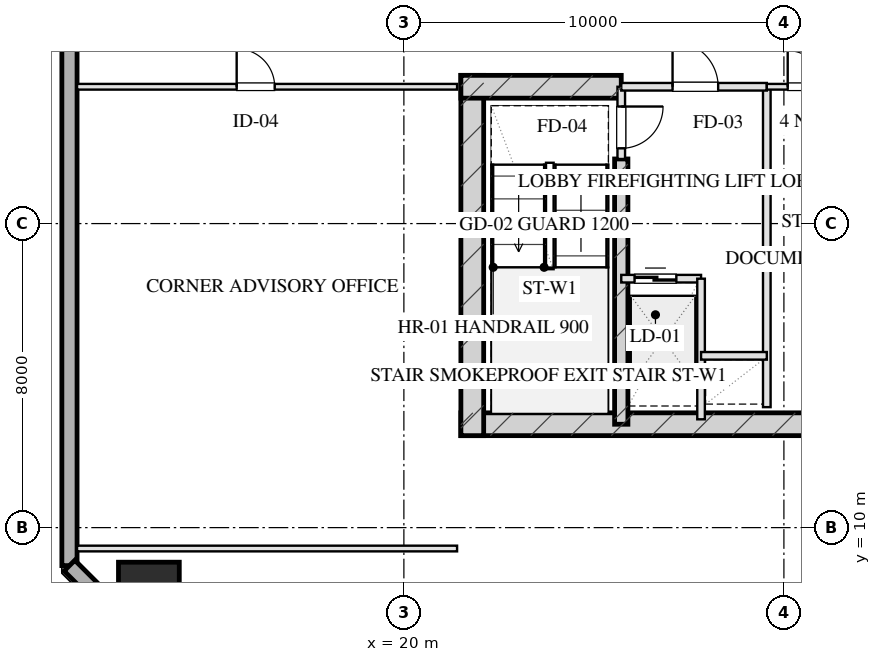
"""IFC4 building model, lengths in metres.
Left out: names, types, materials, properties, quantities, classifications, styles, units other than length and angle.
Written with IfcOpenShell. Run it as: python <this file> out.ifc"""

import sys

from ifc_helpers import new_model, si_unit, direction, frame, frame_2d, origin, origin_2d, place, context, subcontext, project, spatial, rectangle, hollow_rectangle, extrude, element, fill, save


model = new_model("IFC4")
c1 = context("Model", 3, precision=1e-05, world=origin(), true_north=direction((0.0, 1.0)))
c2 = subcontext(c1, "Body", "Model", "MODEL_VIEW")
j1 = project(units=[si_unit("LENGTHUNIT", "METRE"), si_unit("PLANEANGLEUNIT", "RADIAN")], contexts=[c1])
p1 = place(None, origin())
s1 = spatial("IfcSite", under=j1, at=p1, CompositionType="ELEMENT")
p2 = place(p1, origin())
s2 = spatial("IfcBuilding", under=s1, at=p2, CompositionType="ELEMENT")
p3 = place(p2, frame((0.0, 0.0, 113.85)))
s3 = spatial("IfcBuildingStorey", under=s2, at=p3, CompositionType="ELEMENT", Elevation=113.85)
p4 = place(p3, frame((21.5, 12.72, 0.0), z_axis=(0.0, 0.0, 1.0), x_axis=(1.0, 0.0, 0.0)))
e1 = element("IfcWall", 1, at=p4, inside=s3, PredefinedType="SHEAR", context=c2, shape_type="SweptSolid", body=[
    extrude(rectangle(XDim=17.0, YDim=0.6, at=frame_2d((8.5, 0.0))), origin(), (0.0, 0.0, 1.0), 3.45),
])
p5 = place(p3, frame((21.8, 21.9, 0.0), z_axis=(0.0, 0.0, 1.0), x_axis=(0.0, -1.0, 0.0)))
e2 = element("IfcWall", 2, at=p5, inside=s3, PredefinedType="SHEAR", context=c2, shape_type="SweptSolid", body=[
    extrude(rectangle(XDim=9.48, YDim=0.6, at=frame_2d((4.74, 0.0))), origin(), (0.0, 0.0, 1.0), 3.45),
])
p6 = place(p3, frame((25.72, 19.7, 0.0), z_axis=(0.0, 0.0, 1.0), x_axis=(0.0, -1.0, 0.0)))
e3 = element("IfcWall", 3, at=p6, inside=s3, PredefinedType="SHEAR", context=c2, shape_type="SweptSolid", body=[
    extrude(rectangle(XDim=6.98, YDim=0.35, at=frame_2d((3.49, 0.0))), origin(), (0.0, 0.0, 1.0), 3.45),
])
p7 = place(p3, frame((21.5, 21.6, 0.0), z_axis=(0.0, 0.0, 1.0), x_axis=(1.0, 0.0, 0.0)))
e4 = element("IfcWall", 4, at=p7, inside=s3, PredefinedType="SHEAR", context=c2, shape_type="SweptSolid", body=[
    extrude(rectangle(XDim=4.22, YDim=0.6, at=frame_2d((2.11, 0.0))), origin(), (0.0, 0.0, 1.0), 3.45),
])
p8 = place(p3, frame((13.29, 8.29, 0.0), z_axis=(0.0, 0.0, 1.0), x_axis=(1.0, 0.0, 0.0)))
e5 = element("IfcColumn", 5, at=p8, inside=s3, PredefinedType="COLUMN", context=c2, shape_type="SweptSolid", body=[
    extrude(hollow_rectangle(XDim=1.6, YDim=1.6, WallThickness=0.055, at=origin_2d()), origin(), (0.0, 0.0, 1.0), 3.451),
])
p9 = place(p3, frame((11.2, 9.0, 0.0), z_axis=(0.0, 0.0, 1.0), x_axis=(0.0, 1.0, 0.0)))
e6 = element("IfcWall", 6, at=p9, inside=s3, PredefinedType="SOLIDWALL", context=c2, shape_type="SweptSolid", body=[
    extrude(rectangle(XDim=50.0, YDim=0.4, at=frame_2d((25.0, 0.0))), origin(), (0.0, 0.0, 1.0), 2.61),
])
p10 = place(p9, frame((27.336, 0.0, 0.0)))
e7 = element("IfcOpeningElement", 7, at=p10, cuts=e6, PredefinedType="OPENING", context=c2, shape_type="SweptSolid", body=[
    extrude(rectangle(XDim=1.1, YDim=2.15, at=frame_2d((0.55, 1.075))), frame((0.0, 0.21, 0.0), z_axis=(0.0, -1.0, 0.0), x_axis=(1.0, 0.0, 0.0)), (0.0, 0.0, 1.0), 0.42),
])
p11 = place(p3, frame((14.0, 6.2, 0.0), z_axis=(0.0, 0.0, 1.0), x_axis=(-0.707106781187, 0.707106781187, 0.0)))
e8 = element("IfcWall", 8, at=p11, inside=s3, PredefinedType="SOLIDWALL", context=c2, shape_type="SweptSolid", body=[
    extrude(rectangle(XDim=3.96, YDim=0.4, at=frame_2d((1.98, 0.0))), origin(), (0.0, 0.0, 1.0), 2.61),
])
p12 = place(p3, frame((25.72, 21.6, 0.0), z_axis=(0.0, 0.0, 1.0), x_axis=(0.0, -1.0, 0.0)))
e9 = element("IfcWall", 9, at=p12, inside=s3, PredefinedType="PARTITIONING", context=c2, shape_type="SweptSolid", body=[
    extrude(rectangle(XDim=1.9, YDim=0.2, at=frame_2d((0.95, 0.0))), origin(), (0.0, 0.0, 1.0), 3.175),
])
p13 = place(p12, frame((0.52, 0.0, 0.0)))
e10 = element("IfcOpeningElement", 10, at=p13, cuts=e9, PredefinedType="OPENING", context=c2, shape_type="SweptSolid", body=[
    extrude(rectangle(XDim=1.1, YDim=2.05, at=frame_2d((0.55, 1.025))), frame((0.0, 0.11, 0.0), z_axis=(0.0, -1.0, 0.0), x_axis=(1.0, 0.0, 0.0)), (0.0, 0.0, 1.0), 0.22),
])
p14 = place(p3, frame((29.55, 21.6, 0.0), z_axis=(0.0, 0.0, 1.0), x_axis=(0.0, -1.0, 0.0)))
e11 = element("IfcWall", 11, at=p14, inside=s3, PredefinedType="PARTITIONING", context=c2, shape_type="SweptSolid", body=[
    extrude(rectangle(XDim=8.43, YDim=0.2, at=frame_2d((4.215, 0.0))), origin(), (0.0, 0.0, 1.0), 3.175),
])
p15 = place(p3, frame((25.72, 21.6, 0.0), z_axis=(0.0, 0.0, 1.0), x_axis=(1.0, 0.0, 0.0)))
e12 = element("IfcWall", 12, at=p15, inside=s3, PredefinedType="PARTITIONING", context=c2, shape_type="SweptSolid", body=[
    extrude(rectangle(XDim=3.83, YDim=0.2, at=frame_2d((1.915, 0.0))), origin(), (0.0, 0.0, 1.0), 3.175),
])
p16 = place(p15, frame((1.35, 0.0, 0.0)))
e13 = element("IfcOpeningElement", 13, at=p16, cuts=e12, PredefinedType="OPENING", context=c2, shape_type="SweptSolid", body=[
    extrude(rectangle(XDim=1.2, YDim=2.05, at=frame_2d((0.6, 1.025))), frame((0.0, 0.11, 0.0), z_axis=(0.0, -1.0, 0.0), x_axis=(1.0, 0.0, 0.0)), (0.0, 0.0, 1.0), 0.22),
])
p17 = place(p3, frame((25.72, 16.55, 0.0), z_axis=(0.0, 0.0, 1.0), x_axis=(1.0, 0.0, 0.0)))
e14 = element("IfcWall", 14, at=p17, inside=s3, PredefinedType="PARTITIONING", context=c2, shape_type="SweptSolid", body=[
    extrude(rectangle(XDim=2.1, YDim=0.2, at=frame_2d((1.05, 0.0))), origin(), (0.0, 0.0, 1.0), 3.175),
])
p18 = place(p17, frame((0.35, 0.0, 0.0)))
e15 = element("IfcOpeningElement", 15, at=p18, cuts=e14, PredefinedType="OPENING", context=c2, shape_type="SweptSolid", body=[
    extrude(rectangle(XDim=1.1, YDim=2.05, at=frame_2d((0.55, 1.025))), frame((0.0, 0.11, 0.0), z_axis=(0.0, -1.0, 0.0), x_axis=(1.0, 0.0, 0.0)), (0.0, 0.0, 1.0), 0.22),
])
p19 = place(p3, frame((27.82, 16.55, 0.0), z_axis=(0.0, 0.0, 1.0), x_axis=(0.0, -1.0, 0.0)))
e16 = element("IfcWall", 16, at=p19, inside=s3, PredefinedType="PARTITIONING", context=c2, shape_type="SweptSolid", body=[
    extrude(rectangle(XDim=3.7, YDim=0.2, at=frame_2d((1.85, 0.0))), origin(), (0.0, 0.0, 1.0), 3.175),
])
p20 = place(p3, frame((27.82, 14.52, 0.0), z_axis=(0.0, 0.0, 1.0), x_axis=(1.0, 0.0, 0.0)))
e17 = element("IfcWall", 17, at=p20, inside=s3, PredefinedType="PARTITIONING", context=c2, shape_type="SweptSolid", body=[
    extrude(rectangle(XDim=1.73, YDim=0.2, at=frame_2d((0.865, 0.0))), origin(), (0.0, 0.0, 1.0), 3.175),
])
p21 = place(p3, frame((29.55, 21.6, 0.0), z_axis=(0.0, 0.0, 1.0), x_axis=(1.0, 0.0, 0.0)))
e18 = element("IfcWall", 18, at=p21, inside=s3, PredefinedType="PARTITIONING", context=c2, shape_type="SweptSolid", body=[
    extrude(rectangle(XDim=4.4, YDim=0.15, at=frame_2d((2.2, 0.0))), origin(), (0.0, 0.0, 1.0), 3.175),
])
p22 = place(p21, frame((0.55, 0.0, 0.0)))
e19 = element("IfcOpeningElement", 19, at=p22, cuts=e18, PredefinedType="OPENING", context=c2, shape_type="SweptSolid", body=[
    extrude(rectangle(XDim=0.95, YDim=2.05, at=frame_2d((0.475, 1.025))), frame((0.0, 0.085, 0.0), z_axis=(0.0, -1.0, 0.0), x_axis=(1.0, 0.0, 0.0)), (0.0, 0.0, 1.0), 0.17),
])
p23 = place(p21, frame((2.7, 0.0, 0.0)))
e20 = element("IfcOpeningElement", 20, at=p23, cuts=e18, PredefinedType="OPENING", context=c2, shape_type="SweptSolid", body=[
    extrude(rectangle(XDim=0.95, YDim=2.05, at=frame_2d((0.475, 1.025))), frame((0.0, 0.085, 0.0), z_axis=(0.0, -1.0, 0.0), x_axis=(1.0, 0.0, 0.0)), (0.0, 0.0, 1.0), 0.17),
])
p24 = place(p3, frame((11.4, 9.45, 0.0), z_axis=(0.0, 0.0, 1.0), x_axis=(1.0, 0.0, 0.0)))
e21 = element("IfcWall", 21, at=p24, inside=s3, PredefinedType="PARTITIONING", context=c2, shape_type="SweptSolid", body=[
    extrude(rectangle(XDim=10.0, YDim=0.15, at=frame_2d((5.0, 0.0))), origin(), (0.0, 0.0, 1.0), 3.175),
])
p25 = place(p3, frame((11.4, 21.6, 0.0), z_axis=(0.0, 0.0, 1.0), x_axis=(1.0, 0.0, 0.0)))
e22 = element("IfcWall", 22, at=p25, inside=s3, PredefinedType="PARTITIONING", context=c2, shape_type="SweptSolid", body=[
    extrude(rectangle(XDim=10.0, YDim=0.15, at=frame_2d((5.0, 0.0))), origin(), (0.0, 0.0, 1.0), 3.175),
])
p26 = place(p25, frame((4.2, 0.0, 0.0)))
e23 = element("IfcOpeningElement", 23, at=p26, cuts=e22, PredefinedType="OPENING", context=c2, shape_type="SweptSolid", body=[
    extrude(rectangle(XDim=1.0, YDim=2.05, at=frame_2d((0.5, 1.025))), frame((0.0, 0.085, 0.0), z_axis=(0.0, -1.0, 0.0), x_axis=(1.0, 0.0, 0.0)), (0.0, 0.0, 1.0), 0.17),
])
p27 = place(p13, origin())
e24 = element("IfcDoor", 24, at=p27, inside=s3, OperationType="SINGLE_SWING_LEFT", PredefinedType="DOOR", context=c2, shape_type="SweptSolid", body=[
    extrude(rectangle(XDim=1.1, YDim=2.05, at=frame_2d((0.55, 1.025))), frame((0.0, 0.025, 0.0), z_axis=(0.0, -1.0, 0.0), x_axis=(1.0, 0.0, 0.0)), (0.0, 0.0, 1.0), 0.05),
])
fill(e10, e24)
p28 = place(p16, origin())
e25 = element("IfcDoor", 25, at=p28, inside=s3, OperationType="SINGLE_SWING_LEFT", PredefinedType="DOOR", context=c2, shape_type="SweptSolid", body=[
    extrude(rectangle(XDim=1.2, YDim=2.05, at=frame_2d((0.6, 1.025))), frame((0.0, 0.025, 0.0), z_axis=(0.0, -1.0, 0.0), x_axis=(1.0, 0.0, 0.0)), (0.0, 0.0, 1.0), 0.05),
])
fill(e13, e25)
p29 = place(p18, origin())
e26 = element("IfcDoor", 26, at=p29, inside=s3, OperationType="DOUBLE_DOOR_SLIDING", PredefinedType="DOOR", context=c2, shape_type="SweptSolid", body=[
    extrude(rectangle(XDim=1.1, YDim=2.05, at=frame_2d((0.55, 1.025))), frame((0.0, 0.025, 0.0), z_axis=(0.0, -1.0, 0.0), x_axis=(1.0, 0.0, 0.0)), (0.0, 0.0, 1.0), 0.05),
])
fill(e15, e26)
p30 = place(p22, origin())
e27 = element("IfcDoor", 27, at=p30, inside=s3, OperationType="SINGLE_SWING_LEFT", PredefinedType="DOOR", context=c2, shape_type="SweptSolid", body=[
    extrude(rectangle(XDim=0.95, YDim=2.05, at=frame_2d((0.475, 1.025))), frame((0.0, 0.025, 0.0), z_axis=(0.0, -1.0, 0.0), x_axis=(1.0, 0.0, 0.0)), (0.0, 0.0, 1.0), 0.05),
])
fill(e19, e27)
p31 = place(p26, origin())
e28 = element("IfcDoor", 28, at=p31, inside=s3, OperationType="SINGLE_SWING_LEFT", PredefinedType="DOOR", context=c2, shape_type="SweptSolid", body=[
    extrude(rectangle(XDim=1.0, YDim=2.05, at=frame_2d((0.5, 1.025))), frame((0.0, 0.025, 0.0), z_axis=(0.0, -1.0, 0.0), x_axis=(1.0, 0.0, 0.0)), (0.0, 0.0, 1.0), 0.05),
])
fill(e23, e28)
save(model, sys.argv[1])
